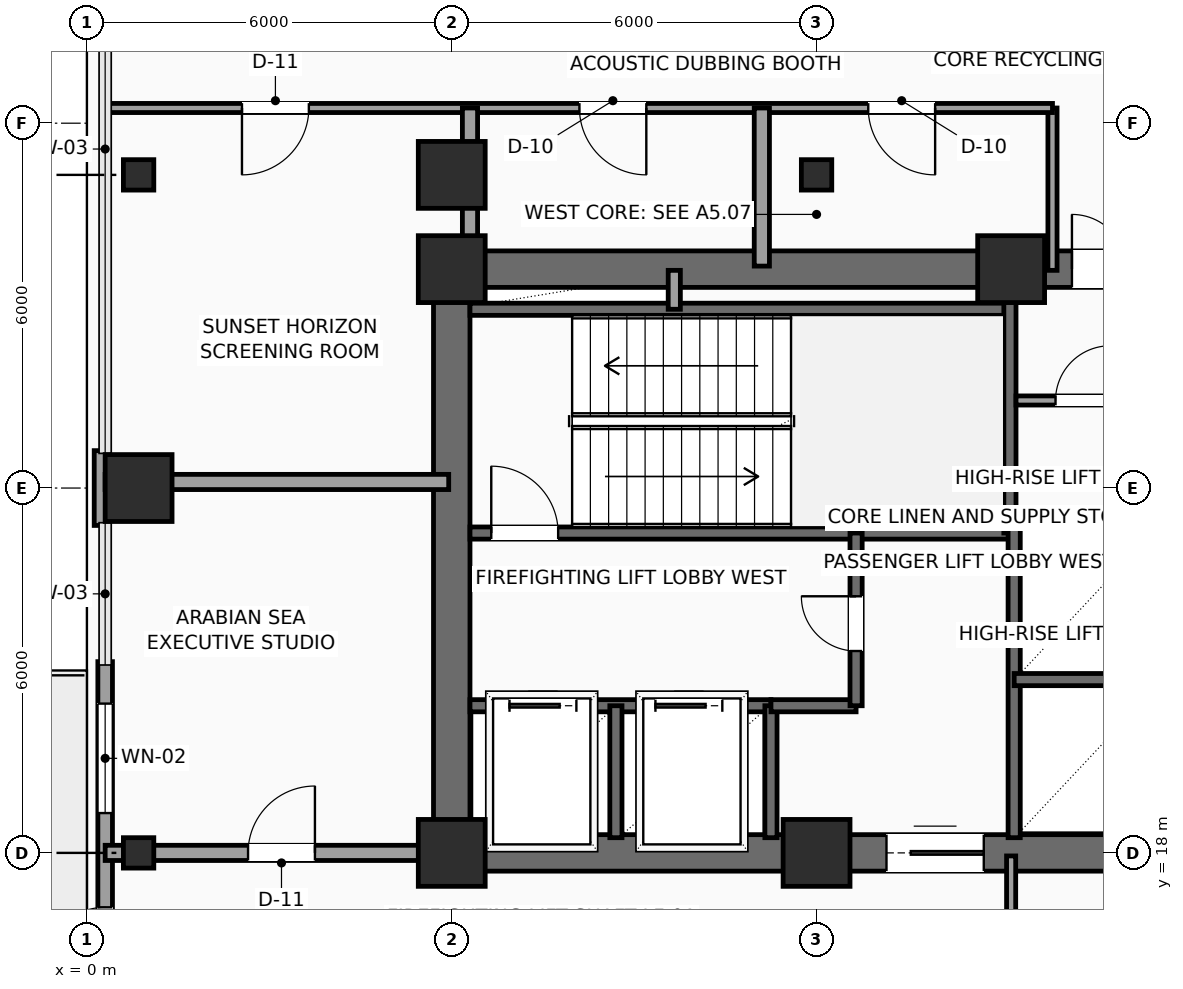
"""IFC4 building model, lengths in metres.
Left out: names, types, materials, properties, quantities, classifications, styles, units other than length and angle.
Written with IfcOpenShell. Run it as: python <this file> out.ifc"""

import sys

from ifc_helpers import new_model, si_unit, direction, frame, frame_2d, origin, origin_2d, place, context, subcontext, project, spatial, rectangle, hollow_rectangle, extrude, element, fill, save


model = new_model("IFC4")
c1 = context("Model", 3, precision=1e-05, world=origin(), true_north=direction((0.0, 1.0)))
c2 = subcontext(c1, "Body", "Model", "MODEL_VIEW")
j1 = project(units=[si_unit("LENGTHUNIT", "METRE"), si_unit("PLANEANGLEUNIT", "RADIAN")], contexts=[c1])
p1 = place(None, origin())
s1 = spatial("IfcSite", under=j1, at=p1, CompositionType="ELEMENT")
p2 = place(p1, origin())
s2 = spatial("IfcBuilding", under=s1, at=p2, CompositionType="ELEMENT")
p3 = place(p2, frame((0.0, 0.0, 126.9)))
s3 = spatial("IfcBuildingStorey", under=s2, at=p3, CompositionType="ELEMENT", Elevation=126.9)
for number, where, z_axis, x_axis in (
    (1, (6.0, 18.0, 0.0), (0.0, 0.0, 1.0), (1.0, 0.0, 0.0)),
    (2, (12.0, 18.0, 0.0), (0.0, 0.0, 1.0), (1.0, 0.0, 0.0)),
    (3, (6.0, 27.6, 0.0), (0.0, 0.0, 1.0), (1.0, 0.0, 0.0)),
    (4, (15.2, 27.6, 0.0), (0.0, 0.0, 1.0), (1.0, 0.0, 0.0)),
):
    element("IfcColumn", number, at=place(p3, frame(where, z_axis=z_axis, x_axis=x_axis)), inside=s3, PredefinedType="COLUMN", context=c2, shape_type="SweptSolid", body=[
        extrude(rectangle(XDim=1.1, YDim=1.1, at=origin_2d()), origin(), (0.0, 0.0, 1.0), 3.75),
    ])
p4 = place(p3, frame((0.85, 18.0, 0.0), z_axis=(0.0, 0.0, 1.0), x_axis=(1.0, 0.0, 0.0)))
e5 = element("IfcColumn", 5, at=p4, inside=s3, PredefinedType="COLUMN", context=c2, shape_type="SweptSolid", body=[
    extrude(hollow_rectangle(XDim=0.5, YDim=0.5, WallThickness=0.025, InnerFilletRadius=0.025, OuterFilletRadius=0.04, at=origin_2d()), origin(), (0.0, 0.0, 1.0), 3.75),
])
p5 = place(p3, frame((0.85, 24.0, 0.0), z_axis=(0.0, 0.0, 1.0), x_axis=(1.0, 0.0, 0.0)))
e6 = element("IfcColumn", 6, at=p5, inside=s3, PredefinedType="COLUMN", context=c2, shape_type="SweptSolid", body=[
    extrude(rectangle(XDim=1.1, YDim=1.1, at=origin_2d()), origin(), (0.0, 0.0, 1.0), 3.75),
])
p6 = place(p3, frame((0.85, 29.15, 0.0), z_axis=(0.0, 0.0, 1.0), x_axis=(1.0, 0.0, 0.0)))
e7 = element("IfcColumn", 7, at=p6, inside=s3, PredefinedType="COLUMN", context=c2, shape_type="SweptSolid", body=[
    extrude(hollow_rectangle(XDim=0.5, YDim=0.5, WallThickness=0.025, InnerFilletRadius=0.025, OuterFilletRadius=0.04, at=origin_2d()), origin(), (0.0, 0.0, 1.0), 3.75),
])
p7 = place(p3, frame((6.0, 29.15, 0.0), z_axis=(0.0, 0.0, 1.0), x_axis=(1.0, 0.0, 0.0)))
e8 = element("IfcColumn", 8, at=p7, inside=s3, PredefinedType="COLUMN", context=c2, shape_type="SweptSolid", body=[
    extrude(rectangle(XDim=1.1, YDim=1.1, at=origin_2d()), origin(), (0.0, 0.0, 1.0), 3.75),
])
p8 = place(p3, frame((12.0, 29.15, 0.0), z_axis=(0.0, 0.0, 1.0), x_axis=(1.0, 0.0, 0.0)))
e9 = element("IfcColumn", 9, at=p8, inside=s3, PredefinedType="COLUMN", context=c2, shape_type="SweptSolid", body=[
    extrude(hollow_rectangle(XDim=0.5, YDim=0.5, WallThickness=0.025, InnerFilletRadius=0.025, OuterFilletRadius=0.04, at=origin_2d()), origin(), (0.0, 0.0, 1.0), 3.75),
])
p9 = place(p3, frame((0.3, 11.855, 0.0), z_axis=(0.0, 0.0, 1.0), x_axis=(0.0, 1.0, 0.0)))
e10 = element("IfcWall", 10, at=p9, inside=s3, PredefinedType="SOLIDWALL", context=c2, shape_type="SweptSolid", body=[
    extrude(rectangle(XDim=9.29, YDim=0.24, at=frame_2d((4.645, 0.0))), origin(), (0.0, 0.0, 1.0), 3.525),
])
p10 = place(p9, frame((4.2, 0.0, 0.0)))
e11 = element("IfcOpeningElement", 11, at=p10, cuts=e10, PredefinedType="OPENING", context=c2, shape_type="SweptSolid", body=[
    extrude(rectangle(XDim=1.05, YDim=2.2, at=frame_2d((0.525, 1.1))), frame((0.0, 0.13, 0.0), z_axis=(0.0, -1.0, 0.0), x_axis=(1.0, 0.0, 0.0)), (0.0, 0.0, 1.0), 0.26),
])
p11 = place(p9, frame((6.8, 0.0, 0.85)))
e12 = element("IfcOpeningElement", 12, at=p11, cuts=e10, PredefinedType="OPENING", context=c2, shape_type="SweptSolid", body=[
    extrude(rectangle(XDim=1.8, YDim=2.1, at=frame_2d((0.9, 1.05))), frame((0.0, 0.13, 0.0), z_axis=(0.0, -1.0, 0.0), x_axis=(1.0, 0.0, 0.0)), (0.0, 0.0, 1.0), 0.26),
])
p12 = place(p3, frame((0.24, 23.385, 0.0), z_axis=(0.0, 0.0, 1.0), x_axis=(0.0, 1.0, 0.0)))
e13 = element("IfcWall", 13, at=p12, inside=s3, PredefinedType="SOLIDWALL", context=c2, shape_type="SweptSolid", body=[
    extrude(rectangle(XDim=1.23, YDim=0.24, at=frame_2d((0.615, 0.0))), origin(), (0.0, 0.0, 1.0), 3.525),
])
p13 = place(p3, frame((6.0, 18.0, 0.0), z_axis=(0.0, 0.0, 1.0), x_axis=(1.0, 0.0, 0.0)))
e14 = element("IfcWall", 14, at=p13, inside=s3, PredefinedType="SHEAR", context=c2, shape_type="SweptSolid", body=[
    extrude(rectangle(XDim=12.0, YDim=0.6, at=frame_2d((6.0, 0.0))), origin(), (0.0, 0.0, 1.0), 3.525),
])
p14 = place(p13, frame((7.15, 0.0, 0.0)))
e15 = element("IfcOpeningElement", 15, at=p14, cuts=e14, PredefinedType="OPENING", context=c2, shape_type="SweptSolid", body=[
    extrude(rectangle(XDim=1.6, YDim=2.3, at=frame_2d((0.8, 1.15))), frame((0.0, 0.31, 0.0), z_axis=(0.0, -1.0, 0.0), x_axis=(1.0, 0.0, 0.0)), (0.0, 0.0, 1.0), 0.62),
])
p15 = place(p3, frame((6.0, 27.6, 0.0), z_axis=(0.0, 0.0, 1.0), x_axis=(1.0, 0.0, 0.0)))
e16 = element("IfcWall", 16, at=p15, inside=s3, PredefinedType="SHEAR", context=c2, shape_type="SweptSolid", body=[
    extrude(rectangle(XDim=12.0, YDim=0.6, at=frame_2d((6.0, 0.0))), origin(), (0.0, 0.0, 1.0), 3.525),
])
p16 = place(p15, frame((10.2, 0.0, 0.0)))
e17 = element("IfcOpeningElement", 17, at=p16, cuts=e16, PredefinedType="OPENING", context=c2, shape_type="SweptSolid", body=[
    extrude(rectangle(XDim=0.9, YDim=2.15, at=frame_2d((0.45, 1.075))), frame((0.0, 0.31, 0.0), z_axis=(0.0, -1.0, 0.0), x_axis=(1.0, 0.0, 0.0)), (0.0, 0.0, 1.0), 0.62),
])
p17 = place(p3, frame((6.0, 18.0, 0.0), z_axis=(0.0, 0.0, 1.0), x_axis=(0.0, 1.0, 0.0)))
e18 = element("IfcWall", 18, at=p17, inside=s3, PredefinedType="SHEAR", context=c2, shape_type="SweptSolid", body=[
    extrude(rectangle(XDim=9.6, YDim=0.6, at=frame_2d((4.8, 0.0))), origin(), (0.0, 0.0, 1.0), 3.525),
])
p18 = place(p3, frame((6.3, 23.26, 0.0), z_axis=(0.0, 0.0, 1.0), x_axis=(1.0, 0.0, 0.0)))
e19 = element("IfcWall", 19, at=p18, inside=s3, PredefinedType="SHEAR", context=c2, shape_type="SweptSolid", body=[
    extrude(rectangle(XDim=8.88, YDim=0.2, at=frame_2d((4.44, 0.0))), origin(), (0.0, 0.0, 1.0), 3.525),
])
p19 = place(p18, frame((0.35, 0.0, 0.0)))
e20 = element("IfcOpeningElement", 20, at=p19, cuts=e19, PredefinedType="OPENING", context=c2, shape_type="SweptSolid", body=[
    extrude(rectangle(XDim=1.1, YDim=2.2, at=frame_2d((0.55, 1.1))), frame((0.0, 0.11, 0.0), z_axis=(0.0, -1.0, 0.0), x_axis=(1.0, 0.0, 0.0)), (0.0, 0.0, 1.0), 0.22),
])
p20 = place(p3, frame((6.3, 26.94, 0.0), z_axis=(0.0, 0.0, 1.0), x_axis=(1.0, 0.0, 0.0)))
e21 = element("IfcWall", 21, at=p20, inside=s3, PredefinedType="SHEAR", context=c2, shape_type="SweptSolid", body=[
    extrude(rectangle(XDim=8.88, YDim=0.2, at=frame_2d((4.44, 0.0))), origin(), (0.0, 0.0, 1.0), 3.525),
])
p21 = place(p3, frame((15.18, 23.26, 0.0), z_axis=(0.0, 0.0, 1.0), x_axis=(0.0, 1.0, 0.0)))
e22 = element("IfcWall", 22, at=p21, inside=s3, PredefinedType="SHEAR", context=c2, shape_type="SweptSolid", body=[
    extrude(rectangle(XDim=4.04, YDim=0.2, at=frame_2d((2.02, 0.0))), origin(), (0.0, 0.0, 1.0), 3.525),
])
p22 = place(p3, frame((6.3, 20.42, 0.0), z_axis=(0.0, 0.0, 1.0), x_axis=(1.0, 0.0, 0.0)))
e23 = element("IfcWall", 23, at=p22, inside=s3, PredefinedType="SHEAR", context=c2, shape_type="SweptSolid", body=[
    extrude(rectangle(XDim=4.95, YDim=0.2, at=frame_2d((2.475, 0.0))), origin(), (0.0, 0.0, 1.0), 3.525),
])
p23 = place(p22, frame((0.65, 0.0, 0.0)))
e24 = element("IfcOpeningElement", 24, at=p23, cuts=e23, PredefinedType="OPENING", context=c2, shape_type="SweptSolid", body=[
    extrude(rectangle(XDim=1.1, YDim=2.2, at=frame_2d((0.55, 1.1))), frame((0.0, 0.11, 0.0), z_axis=(0.0, -1.0, 0.0), x_axis=(1.0, 0.0, 0.0)), (0.0, 0.0, 1.0), 0.22),
])
p24 = place(p22, frame((3.05, 0.0, 0.0)))
e25 = element("IfcOpeningElement", 25, at=p24, cuts=e23, PredefinedType="OPENING", context=c2, shape_type="SweptSolid", body=[
    extrude(rectangle(XDim=1.1, YDim=2.2, at=frame_2d((0.55, 1.1))), frame((0.0, 0.11, 0.0), z_axis=(0.0, -1.0, 0.0), x_axis=(1.0, 0.0, 0.0)), (0.0, 0.0, 1.0), 0.22),
])
for number, where, z_axis, x_axis in (
    (26, (8.7, 18.25, 0.0), (0.0, 0.0, 1.0), (0.0, 1.0, 0.0)),
    (27, (11.25, 18.25, 0.0), (0.0, 0.0, 1.0), (0.0, 1.0, 0.0)),
):
    element("IfcWall", number, at=place(p3, frame(where, z_axis=z_axis, x_axis=x_axis)), inside=s3, PredefinedType="SHEAR", context=c2, shape_type="SweptSolid", body=[
        extrude(rectangle(XDim=2.17, YDim=0.2, at=frame_2d((1.085, 0.0))), origin(), (0.0, 0.0, 1.0), 3.525),
    ])
p25 = place(p3, frame((11.25, 20.42, 0.0), z_axis=(0.0, 0.0, 1.0), x_axis=(1.0, 0.0, 0.0)))
e28 = element("IfcWall", 28, at=p25, inside=s3, PredefinedType="SHEAR", context=c2, shape_type="SweptSolid", body=[
    extrude(rectangle(XDim=1.4, YDim=0.2, at=frame_2d((0.7, 0.0))), origin(), (0.0, 0.0, 1.0), 3.525),
])
p26 = place(p3, frame((12.65, 20.42, 0.0), z_axis=(0.0, 0.0, 1.0), x_axis=(0.0, 1.0, 0.0)))
e29 = element("IfcWall", 29, at=p26, inside=s3, PredefinedType="SHEAR", context=c2, shape_type="SweptSolid", body=[
    extrude(rectangle(XDim=2.84, YDim=0.2, at=frame_2d((1.42, 0.0))), origin(), (0.0, 0.0, 1.0), 3.525),
])
p27 = place(p26, frame((0.9, 0.0, 0.0)))
e30 = element("IfcOpeningElement", 30, at=p27, cuts=e29, PredefinedType="OPENING", context=c2, shape_type="SweptSolid", body=[
    extrude(rectangle(XDim=0.9, YDim=2.15, at=frame_2d((0.45, 1.075))), frame((0.0, 0.11, 0.0), z_axis=(0.0, -1.0, 0.0), x_axis=(1.0, 0.0, 0.0)), (0.0, 0.0, 1.0), 0.22),
])
p28 = place(p3, frame((9.66, 26.94, 0.0), z_axis=(0.0, 0.0, 1.0), x_axis=(0.0, 1.0, 0.0)))
e31 = element("IfcWall", 31, at=p28, inside=s3, PredefinedType="SOLIDWALL", context=c2, shape_type="SweptSolid", body=[
    extrude(rectangle(XDim=0.64, YDim=0.2, at=frame_2d((0.32, 0.0))), origin(), (0.0, 0.0, 1.0), 3.525),
])
p29 = place(p3, frame((15.25, 18.25, 0.0), z_axis=(0.0, 0.0, 1.0), x_axis=(0.0, 1.0, 0.0)))
e32 = element("IfcWall", 32, at=p29, inside=s3, PredefinedType="SHEAR", context=c2, shape_type="SweptSolid", body=[
    extrude(rectangle(XDim=5.2, YDim=0.2, at=frame_2d((2.6, 0.0))), origin(), (0.0, 0.0, 1.0), 3.525),
])
p30 = place(p3, frame((15.25, 20.85, 0.0), z_axis=(0.0, 0.0, 1.0), x_axis=(1.0, 0.0, 0.0)))
e33 = element("IfcWall", 33, at=p30, inside=s3, PredefinedType="SHEAR", context=c2, shape_type="SweptSolid", body=[
    extrude(rectangle(XDim=2.4, YDim=0.2, at=frame_2d((1.2, 0.0))), origin(), (0.0, 0.0, 1.0), 3.525),
])
p31 = place(p3, frame((15.25, 23.45, 0.0), z_axis=(0.0, 0.0, 1.0), x_axis=(1.0, 0.0, 0.0)))
e34 = element("IfcWall", 34, at=p31, inside=s3, PredefinedType="SHEAR", context=c2, shape_type="SweptSolid", body=[
    extrude(rectangle(XDim=2.45, YDim=0.2, at=frame_2d((1.225, 0.0))), origin(), (0.0, 0.0, 1.0), 3.525),
])
p32 = place(p3, frame((15.28, 25.44, 0.0), z_axis=(0.0, 0.0, 1.0), x_axis=(1.0, 0.0, 0.0)))
e35 = element("IfcWall", 35, at=p32, inside=s3, PredefinedType="PARTITIONING", context=c2, shape_type="SweptSolid", body=[
    extrude(rectangle(XDim=2.42, YDim=0.15, at=frame_2d((1.21, 0.0))), origin(), (0.0, 0.0, 1.0), 3.525),
])
p33 = place(p32, frame((0.65, 0.0, 0.0)))
e36 = element("IfcOpeningElement", 36, at=p33, cuts=e35, PredefinedType="OPENING", context=c2, shape_type="SweptSolid", body=[
    extrude(rectangle(XDim=0.9, YDim=2.15, at=frame_2d((0.45, 1.075))), frame((0.0, 0.085, 0.0), z_axis=(0.0, -1.0, 0.0), x_axis=(1.0, 0.0, 0.0)), (0.0, 0.0, 1.0), 0.17),
])
p34 = place(p3, frame((15.2, 17.95, 0.0), z_axis=(0.0, 0.0, 1.0), x_axis=(0.0, -1.0, 0.0)))
e37 = element("IfcWall", 37, at=p34, inside=s3, PredefinedType="PARTITIONING", context=c2, shape_type="SweptSolid", body=[
    extrude(rectangle(XDim=2.4, YDim=0.15, at=frame_2d((1.2, 0.0))), origin(), (0.0, 0.0, 1.0), 3.525),
])
p35 = place(p3, frame((15.88, 27.58, 0.0), z_axis=(0.0, 0.0, 1.0), x_axis=(0.0, 1.0, 0.0)))
e38 = element("IfcWall", 38, at=p35, inside=s3, PredefinedType="PARTITIONING", context=c2, shape_type="SweptSolid", body=[
    extrude(rectangle(XDim=2.67, YDim=0.15, at=frame_2d((1.335, 0.0))), origin(), (0.0, 0.0, 1.0), 3.525),
])
p36 = place(p3, frame((15.88, 30.25, 0.0), z_axis=(0.0, 0.0, 1.0), x_axis=(-1.0, 0.0, 0.0)))
e39 = element("IfcWall", 39, at=p36, inside=s3, PredefinedType="PARTITIONING", context=c2, shape_type="SweptSolid", body=[
    extrude(rectangle(XDim=15.58, YDim=0.15, at=frame_2d((7.79, 0.0))), origin(), (0.0, 0.0, 1.0), 3.525),
])
p37 = place(p36, frame((12.23, 0.0, 0.0)))
e40 = element("IfcOpeningElement", 40, at=p37, cuts=e39, PredefinedType="OPENING", context=c2, shape_type="SweptSolid", body=[
    extrude(rectangle(XDim=1.1, YDim=2.25, at=frame_2d((0.55, 1.125))), frame((0.0, 0.085, 0.0), z_axis=(0.0, -1.0, 0.0), x_axis=(1.0, 0.0, 0.0)), (0.0, 0.0, 1.0), 0.17),
])
p38 = place(p36, frame((6.68, 0.0, 0.0)))
e41 = element("IfcOpeningElement", 41, at=p38, cuts=e39, PredefinedType="OPENING", context=c2, shape_type="SweptSolid", body=[
    extrude(rectangle(XDim=1.1, YDim=2.25, at=frame_2d((0.55, 1.125))), frame((0.0, 0.085, 0.0), z_axis=(0.0, -1.0, 0.0), x_axis=(1.0, 0.0, 0.0)), (0.0, 0.0, 1.0), 0.17),
])
p39 = place(p36, frame((1.93, 0.0, 0.0)))
e42 = element("IfcOpeningElement", 42, at=p39, cuts=e39, PredefinedType="OPENING", context=c2, shape_type="SweptSolid", body=[
    extrude(rectangle(XDim=1.1, YDim=2.25, at=frame_2d((0.55, 1.125))), frame((0.0, 0.085, 0.0), z_axis=(0.0, -1.0, 0.0), x_axis=(1.0, 0.0, 0.0)), (0.0, 0.0, 1.0), 0.17),
])
p40 = place(p3, frame((0.3, 18.0, 0.0), z_axis=(0.0, 0.0, 1.0), x_axis=(1.0, 0.0, 0.0)))
e43 = element("IfcWall", 43, at=p40, inside=s3, PredefinedType="PARTITIONING", context=c2, shape_type="SweptSolid", body=[
    extrude(rectangle(XDim=5.65, YDim=0.25, at=frame_2d((2.825, 0.0))), origin(), (0.0, 0.0, 1.0), 3.017),
])
p41 = place(p40, frame((2.35, 0.0, 0.0)))
e44 = element("IfcOpeningElement", 44, at=p41, cuts=e43, PredefinedType="OPENING", context=c2, shape_type="SweptSolid", body=[
    extrude(rectangle(XDim=1.1, YDim=2.25, at=frame_2d((0.55, 1.125))), frame((0.0, 0.135, 0.0), z_axis=(0.0, -1.0, 0.0), x_axis=(1.0, 0.0, 0.0)), (0.0, 0.0, 1.0), 0.27),
])
p42 = place(p3, frame((0.3, 24.1, 0.0), z_axis=(0.0, 0.0, 1.0), x_axis=(1.0, 0.0, 0.0)))
e45 = element("IfcWall", 45, at=p42, inside=s3, PredefinedType="PARTITIONING", context=c2, shape_type="SweptSolid", body=[
    extrude(rectangle(XDim=5.65, YDim=0.25, at=frame_2d((2.825, 0.0))), origin(), (0.0, 0.0, 1.0), 3.525),
])
p43 = place(p3, frame((6.3, 27.65, 0.0), z_axis=(0.0, 0.0, 1.0), x_axis=(0.0, 1.0, 0.0)))
e46 = element("IfcWall", 46, at=p43, inside=s3, PredefinedType="PARTITIONING", context=c2, shape_type="SweptSolid", body=[
    extrude(rectangle(XDim=2.6, YDim=0.25, at=frame_2d((1.3, 0.0))), origin(), (0.0, 0.0, 1.0), 3.017),
])
p44 = place(p3, frame((11.1, 27.65, 0.0), z_axis=(0.0, 0.0, 1.0), x_axis=(0.0, 1.0, 0.0)))
e47 = element("IfcWall", 47, at=p44, inside=s3, PredefinedType="PARTITIONING", context=c2, shape_type="SweptSolid", body=[
    extrude(rectangle(XDim=2.6, YDim=0.25, at=frame_2d((1.3, 0.0))), origin(), (0.0, 0.0, 1.0), 3.525),
])
p45 = place(p10, origin())
e48 = element("IfcDoor", 48, at=p45, inside=s3, OperationType="SINGLE_SWING_LEFT", PredefinedType="DOOR", context=c2, shape_type="SweptSolid", body=[
    extrude(rectangle(XDim=1.05, YDim=2.2, at=frame_2d((0.525, 1.1))), frame((0.0, 0.025, 0.0), z_axis=(0.0, -1.0, 0.0), x_axis=(1.0, 0.0, 0.0)), (0.0, 0.0, 1.0), 0.05),
])
fill(e11, e48)
p46 = place(p11, origin())
e49 = element("IfcWindow", 49, at=p46, inside=s3, PartitioningType="SINGLE_PANEL", PredefinedType="WINDOW", context=c2, shape_type="SweptSolid", body=[
    extrude(rectangle(XDim=1.8, YDim=2.1, at=frame_2d((0.9, 1.05))), frame((0.0, 0.03, 0.0), z_axis=(0.0, -1.0, 0.0), x_axis=(1.0, 0.0, 0.0)), (0.0, 0.0, 1.0), 0.06),
])
fill(e12, e49)
p47 = place(p14, origin())
e50 = element("IfcDoor", 50, at=p47, inside=s3, OperationType="DOUBLE_DOOR_SLIDING", PredefinedType="DOOR", context=c2, shape_type="SweptSolid", body=[
    extrude(rectangle(XDim=1.6, YDim=2.3, at=frame_2d((0.8, 1.15))), frame((0.0, 0.025, 0.0), z_axis=(0.0, -1.0, 0.0), x_axis=(1.0, 0.0, 0.0)), (0.0, 0.0, 1.0), 0.05),
])
fill(e15, e50)
p48 = place(p16, origin())
e51 = element("IfcDoor", 51, at=p48, inside=s3, OperationType="SINGLE_SWING_LEFT", PredefinedType="DOOR", context=c2, shape_type="SweptSolid", body=[
    extrude(rectangle(XDim=0.9, YDim=2.15, at=frame_2d((0.45, 1.075))), frame((0.0, 0.025, 0.0), z_axis=(0.0, -1.0, 0.0), x_axis=(1.0, 0.0, 0.0)), (0.0, 0.0, 1.0), 0.05),
])
fill(e17, e51)
p49 = place(p19, origin())
e52 = element("IfcDoor", 52, at=p49, inside=s3, OperationType="SINGLE_SWING_LEFT", PredefinedType="DOOR", context=c2, shape_type="SweptSolid", body=[
    extrude(rectangle(XDim=1.1, YDim=2.2, at=frame_2d((0.55, 1.1))), frame((0.0, 0.025, 0.0), z_axis=(0.0, -1.0, 0.0), x_axis=(1.0, 0.0, 0.0)), (0.0, 0.0, 1.0), 0.05),
])
fill(e20, e52)
p50 = place(p23, origin())
e53 = element("IfcDoor", 53, at=p50, inside=s3, OperationType="SLIDING_TO_LEFT", PredefinedType="DOOR", context=c2, shape_type="SweptSolid", body=[
    extrude(rectangle(XDim=1.1, YDim=2.2, at=frame_2d((0.55, 1.1))), frame((0.0, 0.025, 0.0), z_axis=(0.0, -1.0, 0.0), x_axis=(1.0, 0.0, 0.0)), (0.0, 0.0, 1.0), 0.05),
])
fill(e24, e53)
p51 = place(p24, origin())
e54 = element("IfcDoor", 54, at=p51, inside=s3, OperationType="SLIDING_TO_LEFT", PredefinedType="DOOR", context=c2, shape_type="SweptSolid", body=[
    extrude(rectangle(XDim=1.1, YDim=2.2, at=frame_2d((0.55, 1.1))), frame((0.0, 0.025, 0.0), z_axis=(0.0, -1.0, 0.0), x_axis=(1.0, 0.0, 0.0)), (0.0, 0.0, 1.0), 0.05),
])
fill(e25, e54)
p52 = place(p27, origin())
e55 = element("IfcDoor", 55, at=p52, inside=s3, OperationType="SINGLE_SWING_RIGHT", PredefinedType="DOOR", context=c2, shape_type="SweptSolid", body=[
    extrude(rectangle(XDim=0.9, YDim=2.15, at=frame_2d((0.45, 1.075))), frame((0.0, 0.025, 0.0), z_axis=(0.0, -1.0, 0.0), x_axis=(1.0, 0.0, 0.0)), (0.0, 0.0, 1.0), 0.05),
])
fill(e30, e55)
p53 = place(p33, origin())
e56 = element("IfcDoor", 56, at=p53, inside=s3, OperationType="SINGLE_SWING_RIGHT", PredefinedType="DOOR", context=c2, shape_type="SweptSolid", body=[
    extrude(rectangle(XDim=0.9, YDim=2.15, at=frame_2d((0.45, 1.075))), frame((0.0, 0.025, 0.0), z_axis=(0.0, -1.0, 0.0), x_axis=(1.0, 0.0, 0.0)), (0.0, 0.0, 1.0), 0.05),
])
fill(e36, e56)
p54 = place(p37, origin())
e57 = element("IfcDoor", 57, at=p54, inside=s3, OperationType="SINGLE_SWING_RIGHT", PredefinedType="DOOR", context=c2, shape_type="SweptSolid", body=[
    extrude(rectangle(XDim=1.1, YDim=2.25, at=frame_2d((0.55, 1.125))), frame((0.0, 0.025, 0.0), z_axis=(0.0, -1.0, 0.0), x_axis=(1.0, 0.0, 0.0)), (0.0, 0.0, 1.0), 0.05),
])
fill(e40, e57)
p55 = place(p38, origin())
e58 = element("IfcDoor", 58, at=p55, inside=s3, OperationType="SINGLE_SWING_LEFT", PredefinedType="DOOR", context=c2, shape_type="SweptSolid", body=[
    extrude(rectangle(XDim=1.1, YDim=2.25, at=frame_2d((0.55, 1.125))), frame((0.0, 0.025, 0.0), z_axis=(0.0, -1.0, 0.0), x_axis=(1.0, 0.0, 0.0)), (0.0, 0.0, 1.0), 0.05),
])
fill(e41, e58)
p56 = place(p39, origin())
e59 = element("IfcDoor", 59, at=p56, inside=s3, OperationType="SINGLE_SWING_LEFT", PredefinedType="DOOR", context=c2, shape_type="SweptSolid", body=[
    extrude(rectangle(XDim=1.1, YDim=2.25, at=frame_2d((0.55, 1.125))), frame((0.0, 0.025, 0.0), z_axis=(0.0, -1.0, 0.0), x_axis=(1.0, 0.0, 0.0)), (0.0, 0.0, 1.0), 0.05),
])
fill(e42, e59)
p57 = place(p41, origin())
e60 = element("IfcDoor", 60, at=p57, inside=s3, OperationType="SINGLE_SWING_RIGHT", PredefinedType="DOOR", context=c2, shape_type="SweptSolid", body=[
    extrude(rectangle(XDim=1.1, YDim=2.25, at=frame_2d((0.55, 1.125))), frame((0.0, 0.025, 0.0), z_axis=(0.0, -1.0, 0.0), x_axis=(1.0, 0.0, 0.0)), (0.0, 0.0, 1.0), 0.05),
])
fill(e44, e60)
save(model, sys.argv[1])
